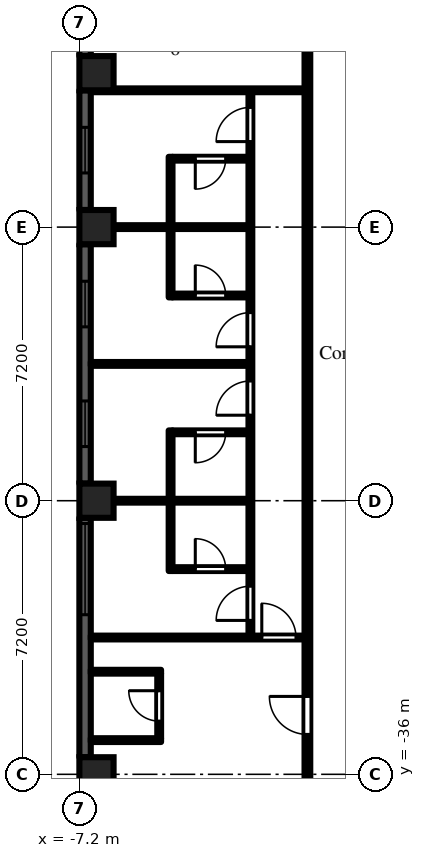
"""IFC4 building model, lengths in metres.
Left out: names, types, materials, properties, quantities, classifications, styles, units other than length and angle.
Written with IfcOpenShell. Run it as: python <this file> out.ifc"""

import sys

from ifc_helpers import new_model, si_unit, direction, frame, frame_2d, origin, origin_2d, place, context, subcontext, project, spatial, rectangle, extrude, element, fill, save


model = new_model("IFC4")
c1 = context("Model", 3, precision=1e-05, world=origin(), true_north=direction((0.0, 1.0)))
c2 = subcontext(c1, "Body", "Model", "MODEL_VIEW")
j1 = project(units=[si_unit("LENGTHUNIT", "METRE"), si_unit("PLANEANGLEUNIT", "RADIAN")], contexts=[c1])
p1 = place(None, origin())
s1 = spatial("IfcSite", under=j1, at=p1, CompositionType="ELEMENT")
p2 = place(p1, origin())
s2 = spatial("IfcBuilding", under=s1, at=p2, CompositionType="ELEMENT")
p3 = place(p2, frame((0.0, 0.0, 84.9)))
s3 = spatial("IfcBuildingStorey", under=s2, at=p3, CompositionType="ELEMENT", Elevation=84.9)
for number, where, z_axis, x_axis in (
    (1, (-6.75, -36.0, 0.0), (0.0, 0.0, 1.0), (1.0, 0.0, 0.0)),
    (2, (-6.75, -28.8, 0.0), (0.0, 0.0, 1.0), (1.0, 0.0, 0.0)),
    (3, (-6.75, -21.6, 0.0), (0.0, 0.0, 1.0), (1.0, 0.0, 0.0)),
    (4, (-6.75, -17.55, 0.0), (0.0, 0.0, 1.0), (1.0, 0.0, 0.0)),
):
    element("IfcColumn", number, at=place(p3, frame(where, z_axis=z_axis, x_axis=x_axis)), inside=s3, PredefinedType="COLUMN", context=c2, shape_type="SweptSolid", body=[
        extrude(rectangle(XDim=0.9, YDim=0.9, at=origin_2d()), origin(), (0.0, 0.0, 1.0), 3.0),
    ])
p4 = place(p3, frame((-7.05, -15.3, 0.0), z_axis=(0.0, 0.0, 1.0), x_axis=(0.0, -1.0, 0.0)))
e5 = element("IfcWall", 5, at=p4, inside=s3, PredefinedType="SOLIDWALL", context=c2, shape_type="SweptSolid", body=[
    extrude(rectangle(XDim=1.8, YDim=0.3, at=frame_2d((0.9, 0.0))), origin(), (0.0, 0.0, 1.0), 2.1),
])
p5 = place(p4, frame((0.3, 0.0, 0.2)))
e6 = element("IfcOpeningElement", 6, at=p5, cuts=e5, PredefinedType="OPENING", context=c2, shape_type="SweptSolid", body=[
    extrude(rectangle(XDim=1.2, YDim=1.85, at=frame_2d((0.6, 0.925))), frame((0.0, 0.16, 0.0), z_axis=(0.0, -1.0, 0.0), x_axis=(1.0, 0.0, 0.0)), (0.0, 0.0, 1.0), 0.32),
])
p6 = place(p3, frame((-7.05, -18.0, 0.0), z_axis=(0.0, 0.0, 1.0), x_axis=(0.0, -1.0, 0.0)))
e7 = element("IfcWall", 7, at=p6, inside=s3, PredefinedType="SOLIDWALL", context=c2, shape_type="SweptSolid", body=[
    extrude(rectangle(XDim=3.15, YDim=0.3, at=frame_2d((1.575, 0.0))), origin(), (0.0, 0.0, 1.0), 2.1),
])
p7 = place(p6, frame((0.975, 0.0, 0.2)))
e8 = element("IfcOpeningElement", 8, at=p7, cuts=e7, PredefinedType="OPENING", context=c2, shape_type="SweptSolid", body=[
    extrude(rectangle(XDim=1.2, YDim=1.85, at=frame_2d((0.6, 0.925))), frame((0.0, 0.16, 0.0), z_axis=(0.0, -1.0, 0.0), x_axis=(1.0, 0.0, 0.0)), (0.0, 0.0, 1.0), 0.32),
])
p8 = place(p3, frame((-7.05, -22.05, 0.0), z_axis=(0.0, 0.0, 1.0), x_axis=(0.0, -1.0, 0.0)))
e9 = element("IfcWall", 9, at=p8, inside=s3, PredefinedType="SOLIDWALL", context=c2, shape_type="SweptSolid", body=[
    extrude(rectangle(XDim=6.3, YDim=0.3, at=frame_2d((3.15, 0.0))), origin(), (0.0, 0.0, 1.0), 2.1),
])
p9 = place(p8, frame((0.975, 0.0, 0.2)))
e10 = element("IfcOpeningElement", 10, at=p9, cuts=e9, PredefinedType="OPENING", context=c2, shape_type="SweptSolid", body=[
    extrude(rectangle(XDim=1.2, YDim=1.85, at=frame_2d((0.6, 0.925))), frame((0.0, 0.16, 0.0), z_axis=(0.0, -1.0, 0.0), x_axis=(1.0, 0.0, 0.0)), (0.0, 0.0, 1.0), 0.32),
])
p10 = place(p8, frame((4.125, 0.0, 0.2)))
e11 = element("IfcOpeningElement", 11, at=p10, cuts=e9, PredefinedType="OPENING", context=c2, shape_type="SweptSolid", body=[
    extrude(rectangle(XDim=1.2, YDim=1.85, at=frame_2d((0.6, 0.925))), frame((0.0, 0.16, 0.0), z_axis=(0.0, -1.0, 0.0), x_axis=(1.0, 0.0, 0.0)), (0.0, 0.0, 1.0), 0.32),
])
p11 = place(p3, frame((-7.05, -29.25, 0.0), z_axis=(0.0, 0.0, 1.0), x_axis=(0.0, -1.0, 0.0)))
e12 = element("IfcWall", 12, at=p11, inside=s3, PredefinedType="SOLIDWALL", context=c2, shape_type="SweptSolid", body=[
    extrude(rectangle(XDim=6.3, YDim=0.3, at=frame_2d((3.15, 0.0))), origin(), (0.0, 0.0, 1.0), 2.1),
])
p12 = place(p11, frame((0.15, 0.0, 0.2)))
e13 = element("IfcOpeningElement", 13, at=p12, cuts=e12, PredefinedType="OPENING", context=c2, shape_type="SweptSolid", body=[
    extrude(rectangle(XDim=2.4, YDim=1.85, at=frame_2d((1.2, 0.925))), frame((0.0, 0.16, 0.0), z_axis=(0.0, -1.0, 0.0), x_axis=(1.0, 0.0, 0.0)), (0.0, 0.0, 1.0), 0.32),
])
for number, where, z_axis, x_axis in (
    (14, (-6.9, -35.1, 0.0), (0.0, 0.0, 1.0), (1.0, 0.0, 0.0)),
    (15, (-6.9, -33.3, 0.0), (0.0, 0.0, 1.0), (1.0, 0.0, 0.0)),
):
    element("IfcWall", number, at=place(p3, frame(where, z_axis=z_axis, x_axis=x_axis)), inside=s3, PredefinedType="PARTITIONING", context=c2, shape_type="SweptSolid", body=[
        extrude(rectangle(XDim=1.85, YDim=0.1, at=frame_2d((0.925, 0.0))), origin(), (0.0, 0.0, 1.0), 2.575),
    ])
p13 = place(p3, frame((-6.9, -32.4, 0.0), z_axis=(0.0, 0.0, 1.0), x_axis=(1.0, 0.0, 0.0)))
e16 = element("IfcWall", 16, at=p13, inside=s3, PredefinedType="PARTITIONING", context=c2, shape_type="SweptSolid", body=[
    extrude(rectangle(XDim=5.625, YDim=0.1, at=frame_2d((2.812, 0.0))), origin(), (0.0, 0.0, 1.0), 2.575),
])
p14 = place(p13, frame((4.5, 0.0, 0.0)))
e17 = element("IfcOpeningElement", 17, at=p14, cuts=e16, PredefinedType="OPENING", context=c2, shape_type="SweptSolid", body=[
    extrude(rectangle(XDim=0.9, YDim=2.1, at=frame_2d((0.45, 1.05))), frame((0.0, 0.06, 0.0), z_axis=(0.0, -1.0, 0.0), x_axis=(1.0, 0.0, 0.0)), (0.0, 0.0, 1.0), 0.12),
])
for number, where, z_axis, x_axis in (
    (18, (-6.9, -28.8, 0.0), (0.0, 0.0, 1.0), (1.0, 0.0, 0.0)),
    (19, (-6.9, -25.2, 0.0), (0.0, 0.0, 1.0), (1.0, 0.0, 0.0)),
    (20, (-6.9, -21.6, 0.0), (0.0, 0.0, 1.0), (1.0, 0.0, 0.0)),
):
    element("IfcWall", number, at=place(p3, frame(where, z_axis=z_axis, x_axis=x_axis)), inside=s3, PredefinedType="PARTITIONING", context=c2, shape_type="SweptSolid", body=[
        extrude(rectangle(XDim=4.15, YDim=0.1, at=frame_2d((2.075, 0.0))), origin(), (0.0, 0.0, 1.0), 2.575),
    ])
p15 = place(p3, frame((-6.9, -18.0, 0.0), z_axis=(0.0, 0.0, 1.0), x_axis=(1.0, 0.0, 0.0)))
e21 = element("IfcWall", 21, at=p15, inside=s3, PredefinedType="PARTITIONING", context=c2, shape_type="SweptSolid", body=[
    extrude(rectangle(XDim=5.625, YDim=0.1, at=frame_2d((2.812, 0.0))), origin(), (0.0, 0.0, 1.0), 2.575),
])
p16 = place(p3, frame((-5.1, -35.05, 0.0), z_axis=(0.0, 0.0, 1.0), x_axis=(0.0, 1.0, 0.0)))
e22 = element("IfcWall", 22, at=p16, inside=s3, PredefinedType="PARTITIONING", context=c2, shape_type="SweptSolid", body=[
    extrude(rectangle(XDim=1.7, YDim=0.1, at=frame_2d((0.85, 0.0))), origin(), (0.0, 0.0, 1.0), 2.575),
])
p17 = place(p16, frame((0.45, 0.0, 0.0)))
e23 = element("IfcOpeningElement", 23, at=p17, cuts=e22, PredefinedType="OPENING", context=c2, shape_type="SweptSolid", body=[
    extrude(rectangle(XDim=0.8, YDim=2.1, at=frame_2d((0.4, 1.05))), frame((0.0, 0.06, 0.0), z_axis=(0.0, -1.0, 0.0), x_axis=(1.0, 0.0, 0.0)), (0.0, 0.0, 1.0), 0.12),
])
p18 = place(p3, frame((-4.8, -30.65, 0.0), z_axis=(0.0, 0.0, 1.0), x_axis=(0.0, 1.0, 0.0)))
e24 = element("IfcWall", 24, at=p18, inside=s3, PredefinedType="PARTITIONING", context=c2, shape_type="SweptSolid", body=[
    extrude(rectangle(XDim=3.7, YDim=0.1, at=frame_2d((1.85, 0.0))), origin(), (0.0, 0.0, 1.0), 2.575),
])
p19 = place(p3, frame((-4.75, -30.6, 0.0), z_axis=(0.0, 0.0, 1.0), x_axis=(1.0, 0.0, 0.0)))
e25 = element("IfcWall", 25, at=p19, inside=s3, PredefinedType="PARTITIONING", context=c2, shape_type="SweptSolid", body=[
    extrude(rectangle(XDim=2.0, YDim=0.1, at=frame_2d((1.0, 0.0))), origin(), (0.0, 0.0, 1.0), 2.575),
])
p20 = place(p19, frame((0.6, 0.0, 0.0)))
e26 = element("IfcOpeningElement", 26, at=p20, cuts=e25, PredefinedType="OPENING", context=c2, shape_type="SweptSolid", body=[
    extrude(rectangle(XDim=0.8, YDim=2.1, at=frame_2d((0.4, 1.05))), frame((0.0, 0.06, 0.0), z_axis=(0.0, -1.0, 0.0), x_axis=(1.0, 0.0, 0.0)), (0.0, 0.0, 1.0), 0.12),
])
p21 = place(p3, frame((-4.75, -27.0, 0.0), z_axis=(0.0, 0.0, 1.0), x_axis=(1.0, 0.0, 0.0)))
e27 = element("IfcWall", 27, at=p21, inside=s3, PredefinedType="PARTITIONING", context=c2, shape_type="SweptSolid", body=[
    extrude(rectangle(XDim=2.0, YDim=0.1, at=frame_2d((1.0, 0.0))), origin(), (0.0, 0.0, 1.0), 2.575),
])
p22 = place(p21, frame((0.6, 0.0, 0.0)))
e28 = element("IfcOpeningElement", 28, at=p22, cuts=e27, PredefinedType="OPENING", context=c2, shape_type="SweptSolid", body=[
    extrude(rectangle(XDim=0.8, YDim=2.1, at=frame_2d((0.4, 1.05))), frame((0.0, 0.06, 0.0), z_axis=(0.0, -1.0, 0.0), x_axis=(1.0, 0.0, 0.0)), (0.0, 0.0, 1.0), 0.12),
])
p23 = place(p3, frame((-4.8, -23.45, 0.0), z_axis=(0.0, 0.0, 1.0), x_axis=(0.0, 1.0, 0.0)))
e29 = element("IfcWall", 29, at=p23, inside=s3, PredefinedType="PARTITIONING", context=c2, shape_type="SweptSolid", body=[
    extrude(rectangle(XDim=3.7, YDim=0.1, at=frame_2d((1.85, 0.0))), origin(), (0.0, 0.0, 1.0), 2.575),
])
p24 = place(p3, frame((-4.75, -23.4, 0.0), z_axis=(0.0, 0.0, 1.0), x_axis=(1.0, 0.0, 0.0)))
e30 = element("IfcWall", 30, at=p24, inside=s3, PredefinedType="PARTITIONING", context=c2, shape_type="SweptSolid", body=[
    extrude(rectangle(XDim=2.0, YDim=0.1, at=frame_2d((1.0, 0.0))), origin(), (0.0, 0.0, 1.0), 2.575),
])
p25 = place(p24, frame((0.6, 0.0, 0.0)))
e31 = element("IfcOpeningElement", 31, at=p25, cuts=e30, PredefinedType="OPENING", context=c2, shape_type="SweptSolid", body=[
    extrude(rectangle(XDim=0.8, YDim=2.1, at=frame_2d((0.4, 1.05))), frame((0.0, 0.06, 0.0), z_axis=(0.0, -1.0, 0.0), x_axis=(1.0, 0.0, 0.0)), (0.0, 0.0, 1.0), 0.12),
])
p26 = place(p3, frame((-4.75, -19.8, 0.0), z_axis=(0.0, 0.0, 1.0), x_axis=(1.0, 0.0, 0.0)))
e32 = element("IfcWall", 32, at=p26, inside=s3, PredefinedType="PARTITIONING", context=c2, shape_type="SweptSolid", body=[
    extrude(rectangle(XDim=2.0, YDim=0.1, at=frame_2d((1.0, 0.0))), origin(), (0.0, 0.0, 1.0), 2.575),
])
p27 = place(p26, frame((0.6, 0.0, 0.0)))
e33 = element("IfcOpeningElement", 33, at=p27, cuts=e32, PredefinedType="OPENING", context=c2, shape_type="SweptSolid", body=[
    extrude(rectangle(XDim=0.8, YDim=2.1, at=frame_2d((0.4, 1.05))), frame((0.0, 0.06, 0.0), z_axis=(0.0, -1.0, 0.0), x_axis=(1.0, 0.0, 0.0)), (0.0, 0.0, 1.0), 0.12),
])
p28 = place(p3, frame((-2.7, -32.35, 0.0), z_axis=(0.0, 0.0, 1.0), x_axis=(0.0, 1.0, 0.0)))
e34 = element("IfcWall", 34, at=p28, inside=s3, PredefinedType="PARTITIONING", context=c2, shape_type="SweptSolid", body=[
    extrude(rectangle(XDim=14.3, YDim=0.1, at=frame_2d((7.15, 0.0))), origin(), (0.0, 0.0, 1.0), 2.575),
])
p29 = place(p28, frame((0.4, 0.0, 0.0)))
e35 = element("IfcOpeningElement", 35, at=p29, cuts=e34, PredefinedType="OPENING", context=c2, shape_type="SweptSolid", body=[
    extrude(rectangle(XDim=0.9, YDim=2.1, at=frame_2d((0.45, 1.05))), frame((0.0, 0.06, 0.0), z_axis=(0.0, -1.0, 0.0), x_axis=(1.0, 0.0, 0.0)), (0.0, 0.0, 1.0), 0.12),
])
p30 = place(p28, frame((5.8, 0.0, 0.0)))
e36 = element("IfcOpeningElement", 36, at=p30, cuts=e34, PredefinedType="OPENING", context=c2, shape_type="SweptSolid", body=[
    extrude(rectangle(XDim=0.9, YDim=2.1, at=frame_2d((0.45, 1.05))), frame((0.0, 0.06, 0.0), z_axis=(0.0, -1.0, 0.0), x_axis=(1.0, 0.0, 0.0)), (0.0, 0.0, 1.0), 0.12),
])
p31 = place(p28, frame((7.6, 0.0, 0.0)))
e37 = element("IfcOpeningElement", 37, at=p31, cuts=e34, PredefinedType="OPENING", context=c2, shape_type="SweptSolid", body=[
    extrude(rectangle(XDim=0.9, YDim=2.1, at=frame_2d((0.45, 1.05))), frame((0.0, 0.06, 0.0), z_axis=(0.0, -1.0, 0.0), x_axis=(1.0, 0.0, 0.0)), (0.0, 0.0, 1.0), 0.12),
])
p32 = place(p28, frame((13.0, 0.0, 0.0)))
e38 = element("IfcOpeningElement", 38, at=p32, cuts=e34, PredefinedType="OPENING", context=c2, shape_type="SweptSolid", body=[
    extrude(rectangle(XDim=0.9, YDim=2.1, at=frame_2d((0.45, 1.05))), frame((0.0, 0.06, 0.0), z_axis=(0.0, -1.0, 0.0), x_axis=(1.0, 0.0, 0.0)), (0.0, 0.0, 1.0), 0.12),
])
p33 = place(p3, frame((-1.2, -36.5, 0.0), z_axis=(0.0, 0.0, 1.0), x_axis=(0.0, 1.0, 0.0)))
e39 = element("IfcWall", 39, at=p33, inside=s3, PredefinedType="PARTITIONING", context=c2, shape_type="SweptSolid", body=[
    extrude(rectangle(XDim=35.225, YDim=0.15, at=frame_2d((17.613, 0.0))), origin(), (0.0, 0.0, 1.0), 2.575),
])
p34 = place(p33, frame((30.75, 0.0, 0.0)))
e40 = element("IfcOpeningElement", 40, at=p34, cuts=e39, PredefinedType="OPENING", context=c2, shape_type="SweptSolid", body=[
    extrude(rectangle(XDim=0.9, YDim=2.1, at=frame_2d((0.45, 1.05))), frame((0.0, 0.085, 0.0), z_axis=(0.0, -1.0, 0.0), x_axis=(1.0, 0.0, 0.0)), (0.0, 0.0, 1.0), 0.17),
])
p35 = place(p33, frame((27.05, 0.0, 0.0)))
e41 = element("IfcOpeningElement", 41, at=p35, cuts=e39, PredefinedType="OPENING", context=c2, shape_type="SweptSolid", body=[
    extrude(rectangle(XDim=0.9, YDim=2.1, at=frame_2d((0.45, 1.05))), frame((0.0, 0.085, 0.0), z_axis=(0.0, -1.0, 0.0), x_axis=(1.0, 0.0, 0.0)), (0.0, 0.0, 1.0), 0.17),
])
p36 = place(p33, frame((19.85, 0.0, 0.0)))
e42 = element("IfcOpeningElement", 42, at=p36, cuts=e39, PredefinedType="OPENING", context=c2, shape_type="SweptSolid", body=[
    extrude(rectangle(XDim=0.9, YDim=2.1, at=frame_2d((0.45, 1.05))), frame((0.0, 0.085, 0.0), z_axis=(0.0, -1.0, 0.0), x_axis=(1.0, 0.0, 0.0)), (0.0, 0.0, 1.0), 0.17),
])
p37 = place(p33, frame((1.55, 0.0, 0.0)))
e43 = element("IfcOpeningElement", 43, at=p37, cuts=e39, PredefinedType="OPENING", context=c2, shape_type="SweptSolid", body=[
    extrude(rectangle(XDim=1.0, YDim=2.1, at=frame_2d((0.5, 1.05))), frame((0.0, 0.085, 0.0), z_axis=(0.0, -1.0, 0.0), x_axis=(1.0, 0.0, 0.0)), (0.0, 0.0, 1.0), 0.17),
])
p38 = place(p7, origin())
e44 = element("IfcWindow", 44, at=p38, inside=s3, PartitioningType="SINGLE_PANEL", PredefinedType="WINDOW", context=c2, shape_type="SweptSolid", body=[
    extrude(rectangle(XDim=1.2, YDim=1.85, at=frame_2d((0.6, 0.925))), frame((0.0, 0.03, 0.0), z_axis=(0.0, -1.0, 0.0), x_axis=(1.0, 0.0, 0.0)), (0.0, 0.0, 1.0), 0.06),
])
fill(e8, e44)
p39 = place(p9, origin())
e45 = element("IfcWindow", 45, at=p39, inside=s3, PartitioningType="SINGLE_PANEL", PredefinedType="WINDOW", context=c2, shape_type="SweptSolid", body=[
    extrude(rectangle(XDim=1.2, YDim=1.85, at=frame_2d((0.6, 0.925))), frame((0.0, 0.03, 0.0), z_axis=(0.0, -1.0, 0.0), x_axis=(1.0, 0.0, 0.0)), (0.0, 0.0, 1.0), 0.06),
])
fill(e10, e45)
p40 = place(p10, origin())
e46 = element("IfcWindow", 46, at=p40, inside=s3, PartitioningType="SINGLE_PANEL", PredefinedType="WINDOW", context=c2, shape_type="SweptSolid", body=[
    extrude(rectangle(XDim=1.2, YDim=1.85, at=frame_2d((0.6, 0.925))), frame((0.0, 0.03, 0.0), z_axis=(0.0, -1.0, 0.0), x_axis=(1.0, 0.0, 0.0)), (0.0, 0.0, 1.0), 0.06),
])
fill(e11, e46)
p41 = place(p12, origin())
e47 = element("IfcWindow", 47, at=p41, inside=s3, PartitioningType="SINGLE_PANEL", PredefinedType="WINDOW", context=c2, shape_type="SweptSolid", body=[
    extrude(rectangle(XDim=2.4, YDim=1.85, at=frame_2d((1.2, 0.925))), frame((0.0, 0.03, 0.0), z_axis=(0.0, -1.0, 0.0), x_axis=(1.0, 0.0, 0.0)), (0.0, 0.0, 1.0), 0.06),
])
fill(e13, e47)
p42 = place(p17, origin())
e48 = element("IfcDoor", 48, at=p42, inside=s3, OperationType="SINGLE_SWING_RIGHT", PredefinedType="DOOR", context=c2, shape_type="SweptSolid", body=[
    extrude(rectangle(XDim=0.8, YDim=2.1, at=frame_2d((0.4, 1.05))), frame((0.0, 0.025, 0.0), z_axis=(0.0, -1.0, 0.0), x_axis=(1.0, 0.0, 0.0)), (0.0, 0.0, 1.0), 0.05),
])
fill(e23, e48)
p43 = place(p37, origin())
e49 = element("IfcDoor", 49, at=p43, inside=s3, OperationType="SINGLE_SWING_RIGHT", PredefinedType="DOOR", context=c2, shape_type="SweptSolid", body=[
    extrude(rectangle(XDim=1.0, YDim=2.1, at=frame_2d((0.5, 1.05))), frame((0.0, 0.025, 0.0), z_axis=(0.0, -1.0, 0.0), x_axis=(1.0, 0.0, 0.0)), (0.0, 0.0, 1.0), 0.05),
])
fill(e43, e49)
p44 = place(p29, origin())
e50 = element("IfcDoor", 50, at=p44, inside=s3, OperationType="SINGLE_SWING_LEFT", PredefinedType="DOOR", context=c2, shape_type="SweptSolid", body=[
    extrude(rectangle(XDim=0.9, YDim=2.1, at=frame_2d((0.45, 1.05))), frame((0.0, 0.025, 0.0), z_axis=(0.0, -1.0, 0.0), x_axis=(1.0, 0.0, 0.0)), (0.0, 0.0, 1.0), 0.05),
])
fill(e35, e50)
p45 = place(p30, origin())
e51 = element("IfcDoor", 51, at=p45, inside=s3, OperationType="SINGLE_SWING_LEFT", PredefinedType="DOOR", context=c2, shape_type="SweptSolid", body=[
    extrude(rectangle(XDim=0.9, YDim=2.1, at=frame_2d((0.45, 1.05))), frame((0.0, 0.025, 0.0), z_axis=(0.0, -1.0, 0.0), x_axis=(1.0, 0.0, 0.0)), (0.0, 0.0, 1.0), 0.05),
])
fill(e36, e51)
p46 = place(p31, origin())
e52 = element("IfcDoor", 52, at=p46, inside=s3, OperationType="SINGLE_SWING_LEFT", PredefinedType="DOOR", context=c2, shape_type="SweptSolid", body=[
    extrude(rectangle(XDim=0.9, YDim=2.1, at=frame_2d((0.45, 1.05))), frame((0.0, 0.025, 0.0), z_axis=(0.0, -1.0, 0.0), x_axis=(1.0, 0.0, 0.0)), (0.0, 0.0, 1.0), 0.05),
])
fill(e37, e52)
p47 = place(p32, origin())
e53 = element("IfcDoor", 53, at=p47, inside=s3, OperationType="SINGLE_SWING_LEFT", PredefinedType="DOOR", context=c2, shape_type="SweptSolid", body=[
    extrude(rectangle(XDim=0.9, YDim=2.1, at=frame_2d((0.45, 1.05))), frame((0.0, 0.025, 0.0), z_axis=(0.0, -1.0, 0.0), x_axis=(1.0, 0.0, 0.0)), (0.0, 0.0, 1.0), 0.05),
])
fill(e38, e53)
p48 = place(p14, origin())
e54 = element("IfcDoor", 54, at=p48, inside=s3, OperationType="SINGLE_SWING_LEFT", PredefinedType="DOOR", context=c2, shape_type="SweptSolid", body=[
    extrude(rectangle(XDim=0.9, YDim=2.1, at=frame_2d((0.45, 1.05))), frame((0.0, 0.025, 0.0), z_axis=(0.0, -1.0, 0.0), x_axis=(1.0, 0.0, 0.0)), (0.0, 0.0, 1.0), 0.05),
])
fill(e17, e54)
p49 = place(p27, frame((0.8, 0.0, 0.0), z_axis=(0.0, 0.0, 1.0), x_axis=(-1.0, 0.0, 0.0)))
e55 = element("IfcDoor", 55, at=p49, inside=s3, OperationType="SINGLE_SWING_RIGHT", PredefinedType="DOOR", context=c2, shape_type="SweptSolid", body=[
    extrude(rectangle(XDim=0.8, YDim=2.1, at=frame_2d((0.4, 1.05))), frame((0.0, 0.025, 0.0), z_axis=(0.0, -1.0, 0.0), x_axis=(1.0, 0.0, 0.0)), (0.0, 0.0, 1.0), 0.05),
])
fill(e33, e55)
p50 = place(p25, origin())
e56 = element("IfcDoor", 56, at=p50, inside=s3, OperationType="SINGLE_SWING_LEFT", PredefinedType="DOOR", context=c2, shape_type="SweptSolid", body=[
    extrude(rectangle(XDim=0.8, YDim=2.1, at=frame_2d((0.4, 1.05))), frame((0.0, 0.025, 0.0), z_axis=(0.0, -1.0, 0.0), x_axis=(1.0, 0.0, 0.0)), (0.0, 0.0, 1.0), 0.05),
])
fill(e31, e56)
p51 = place(p22, frame((0.8, 0.0, 0.0), z_axis=(0.0, 0.0, 1.0), x_axis=(-1.0, 0.0, 0.0)))
e57 = element("IfcDoor", 57, at=p51, inside=s3, OperationType="SINGLE_SWING_RIGHT", PredefinedType="DOOR", context=c2, shape_type="SweptSolid", body=[
    extrude(rectangle(XDim=0.8, YDim=2.1, at=frame_2d((0.4, 1.05))), frame((0.0, 0.025, 0.0), z_axis=(0.0, -1.0, 0.0), x_axis=(1.0, 0.0, 0.0)), (0.0, 0.0, 1.0), 0.05),
])
fill(e28, e57)
p52 = place(p20, origin())
e58 = element("IfcDoor", 58, at=p52, inside=s3, OperationType="SINGLE_SWING_LEFT", PredefinedType="DOOR", context=c2, shape_type="SweptSolid", body=[
    extrude(rectangle(XDim=0.8, YDim=2.1, at=frame_2d((0.4, 1.05))), frame((0.0, 0.025, 0.0), z_axis=(0.0, -1.0, 0.0), x_axis=(1.0, 0.0, 0.0)), (0.0, 0.0, 1.0), 0.05),
])
fill(e26, e58)
save(model, sys.argv[1])
